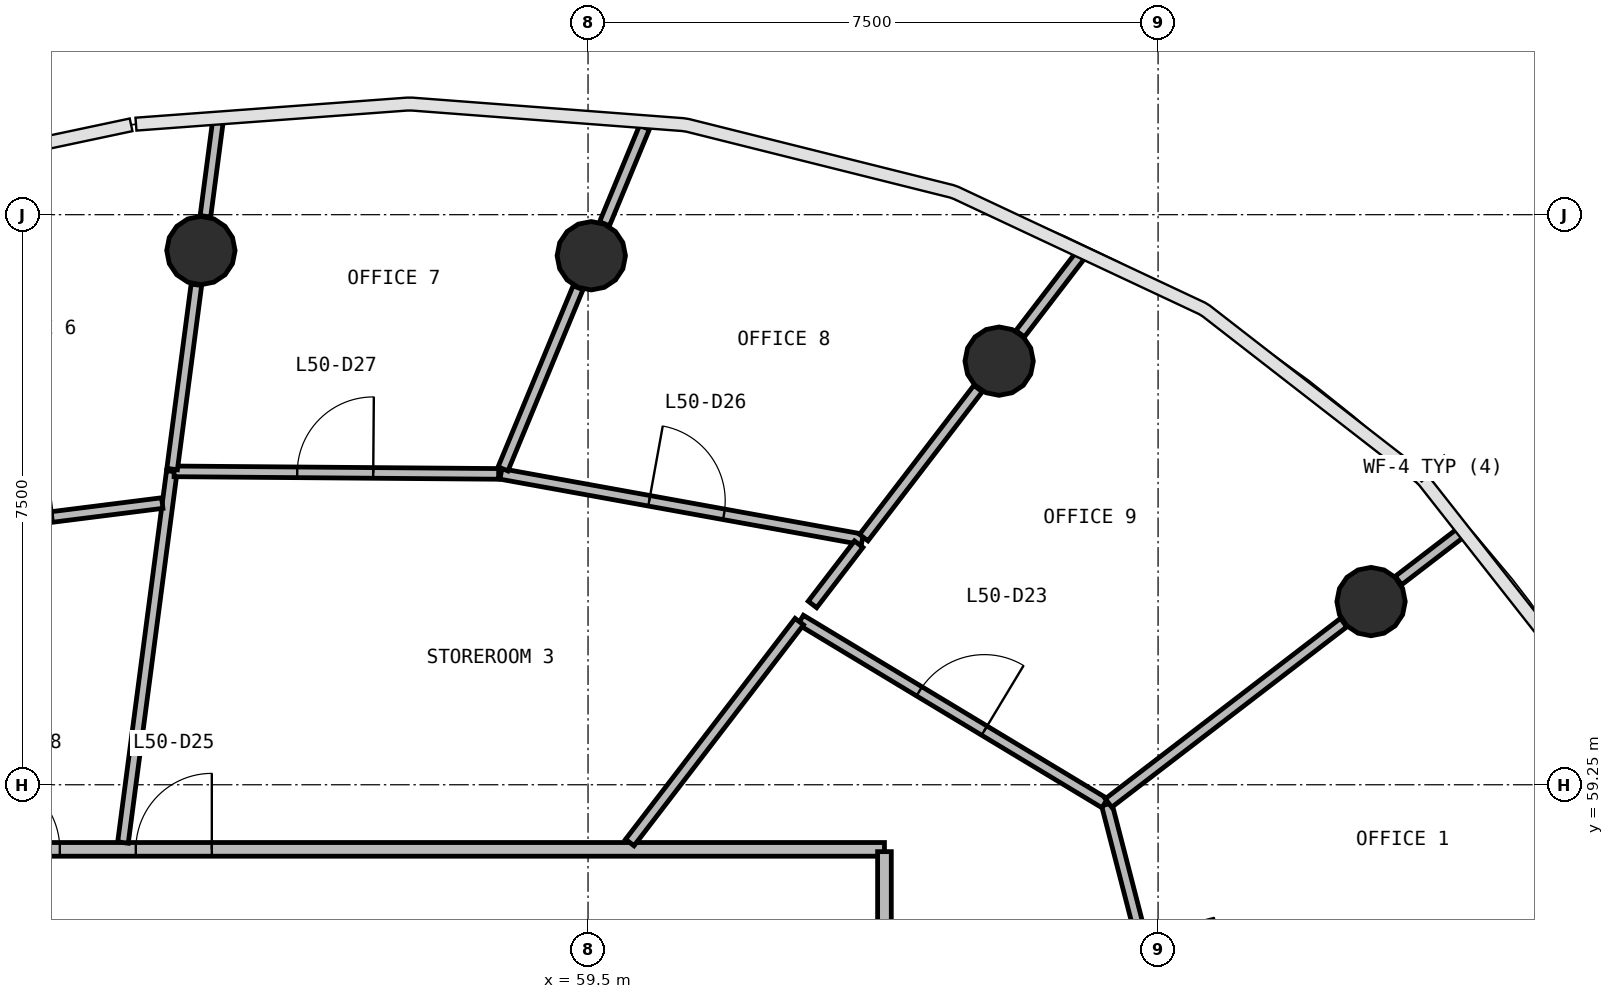
"""IFC4 building model, lengths in metres.
Left out: names, types, materials, properties, quantities, classifications, styles, units other than length and angle.
Written with IfcOpenShell. Run it as: python <this file> out.ifc"""

import sys

from ifc_helpers import new_model, si_unit, direction, frame, frame_2d, origin, origin_2d, place, context, subcontext, project, spatial, rectangle, circle, extrude, source, transform, mapped, element, fill, save


model = new_model("IFC4")
c1 = context("Model", 3, precision=1e-05, world=origin(), true_north=direction((0.0, 1.0)))
c2 = subcontext(c1, "Body", "Model", "MODEL_VIEW")
j1 = project(units=[si_unit("LENGTHUNIT", "METRE"), si_unit("PLANEANGLEUNIT", "RADIAN")], contexts=[c1])
p1 = place(None, origin())
s1 = spatial("IfcSite", under=j1, at=p1, CompositionType="ELEMENT")
p2 = place(p1, origin())
s2 = spatial("IfcBuilding", under=s1, at=p2, CompositionType="ELEMENT")
p3 = place(p2, frame((0.0, 0.0, 207.2)))
s3 = spatial("IfcBuildingStorey", under=s2, at=p3, CompositionType="ELEMENT", Elevation=207.2)
m1 = source(origin(), c2, "Body", "SweptSolid", [
    extrude(circle(Radius=0.45, at=origin_2d()), origin(), (0.0, 0.0, 1.0), 3.9),
])
for number, where, z_axis, x_axis in (
    (1, (69.802, 61.66, 0.0), (0.0, 0.0, 1.0), (1.0, 0.0, 0.0)),
    (2, (64.909, 64.823, 0.0), (0.0, 0.0, 1.0), (1.0, 0.0, 0.0)),
    (3, (59.543, 66.21, 0.0), (0.0, 0.0, 1.0), (1.0, 0.0, 0.0)),
    (4, (54.406, 66.278, 0.0), (0.0, 0.0, 1.0), (1.0, 0.0, 0.0)),
):
    element("IfcColumn", number, at=place(p3, frame(where, z_axis=z_axis, x_axis=x_axis)), inside=s3, PredefinedType="COLUMN", context=c2, shape_type="MappedRepresentation", body=[
        mapped(m1, transform((0.0, 0.0, 0.0), scale=1.0)),
    ])
p4 = place(p3, frame((40.6, 58.4, 0.0), z_axis=(0.0, 0.0, 1.0), x_axis=(1.0, 0.0, 0.0)))
e5 = element("IfcWall", 5, at=p4, inside=s3, PredefinedType="PARTITIONING", context=c2, shape_type="SweptSolid", body=[
    extrude(rectangle(XDim=22.8, YDim=0.18, at=frame_2d((11.4, 0.0))), origin(), (0.0, 0.0, 1.0), 2.88),
])
p5 = place(p4, frame((12.95, 0.0, 0.0)))
e6 = element("IfcOpeningElement", 6, at=p5, cuts=e5, PredefinedType="OPENING", context=c2, shape_type="SweptSolid", body=[
    extrude(rectangle(XDim=1.0, YDim=2.1, at=frame_2d((0.5, 1.05))), frame((0.0, 0.1, 0.0), z_axis=(0.0, -1.0, 0.0), x_axis=(1.0, 0.0, 0.0)), (0.0, 0.0, 1.0), 0.2),
])
p6 = place(p4, frame((10.95, 0.0, 0.0)))
e7 = element("IfcOpeningElement", 7, at=p6, cuts=e5, PredefinedType="OPENING", context=c2, shape_type="SweptSolid", body=[
    extrude(rectangle(XDim=1.0, YDim=2.1, at=frame_2d((0.5, 1.05))), frame((0.0, 0.1, 0.0), z_axis=(0.0, -1.0, 0.0), x_axis=(1.0, 0.0, 0.0)), (0.0, 0.0, 1.0), 0.2),
])
p7 = place(p3, frame((63.4, 58.37, 0.0), z_axis=(0.0, 0.0, 1.0), x_axis=(0.0, -1.0, 0.0)))
e8 = element("IfcWall", 8, at=p7, inside=s3, PredefinedType="PARTITIONING", context=c2, shape_type="SweptSolid", body=[
    extrude(rectangle(XDim=20.74, YDim=0.18, at=frame_2d((10.37, 0.0))), origin(), (0.0, 0.0, 1.0), 2.88),
])
p8 = place(p7, frame((9.99, 0.0, 0.0)))
e9 = element("IfcOpeningElement", 9, at=p8, cuts=e8, PredefinedType="OPENING", context=c2, shape_type="SweptSolid", body=[
    extrude(rectangle(XDim=0.9, YDim=2.1, at=frame_2d((0.45, 1.05))), frame((0.0, 0.1, 0.0), z_axis=(0.0, -1.0, 0.0), x_axis=(1.0, 0.0, 0.0)), (0.0, 0.0, 1.0), 0.2),
])
p9 = place(p7, frame((7.79, 0.0, 0.0)))
e10 = element("IfcOpeningElement", 10, at=p9, cuts=e8, PredefinedType="OPENING", context=c2, shape_type="SweptSolid", body=[
    extrude(rectangle(XDim=0.9, YDim=2.1, at=frame_2d((0.45, 1.05))), frame((0.0, 0.1, 0.0), z_axis=(0.0, -1.0, 0.0), x_axis=(1.0, 0.0, 0.0)), (0.0, 0.0, 1.0), 0.2),
])
p10 = place(p7, frame((4.29, 0.0, 0.0)))
e11 = element("IfcOpeningElement", 11, at=p10, cuts=e8, PredefinedType="OPENING", context=c2, shape_type="SweptSolid", body=[
    extrude(rectangle(XDim=1.0, YDim=2.1, at=frame_2d((0.5, 1.05))), frame((0.0, 0.1, 0.0), z_axis=(0.0, -1.0, 0.0), x_axis=(1.0, 0.0, 0.0)), (0.0, 0.0, 1.0), 0.2),
])
p11 = place(p7, frame((15.49, 0.0, 0.0)))
e12 = element("IfcOpeningElement", 12, at=p11, cuts=e8, PredefinedType="OPENING", context=c2, shape_type="SweptSolid", body=[
    extrude(rectangle(XDim=1.0, YDim=2.1, at=frame_2d((0.5, 1.05))), frame((0.0, 0.1, 0.0), z_axis=(0.0, -1.0, 0.0), x_axis=(1.0, 0.0, 0.0)), (0.0, 0.0, 1.0), 0.2),
])
p12 = place(p7, frame((12.09, 0.0, 0.0)))
e13 = element("IfcOpeningElement", 13, at=p12, cuts=e8, PredefinedType="OPENING", context=c2, shape_type="SweptSolid", body=[
    extrude(rectangle(XDim=1.0, YDim=2.1, at=frame_2d((0.5, 1.05))), frame((0.0, 0.1, 0.0), z_axis=(0.0, -1.0, 0.0), x_axis=(1.0, 0.0, 0.0)), (0.0, 0.0, 1.0), 0.2),
])
p13 = place(p3, frame((53.381, 58.49, 0.0), z_axis=(0.0, 0.0, 1.0), x_axis=(0.130510929427, 0.991446870639, 0.0)))
e14 = element("IfcWall", 14, at=p13, inside=s3, PredefinedType="PARTITIONING", context=c2, shape_type="SweptSolid", body=[
    extrude(rectangle(XDim=4.926, YDim=0.14, at=frame_2d((2.463, 0.0))), origin(), (0.0, 0.0, 1.0), 2.88),
])
p14 = place(p3, frame((58.354, 63.339, 0.0), z_axis=(0.0, 0.0, 1.0), x_axis=(0.983980456021, -0.178276364581, 0.0)))
e15 = element("IfcWall", 15, at=p14, inside=s3, PredefinedType="PARTITIONING", context=c2, shape_type="SweptSolid", body=[
    extrude(rectangle(XDim=4.833, YDim=0.14, at=frame_2d((2.417, 0.0))), origin(), (0.0, 0.0, 1.0), 2.88),
])
p15 = place(p14, frame((1.983, 0.0, 0.0)))
e16 = element("IfcOpeningElement", 16, at=p15, cuts=e15, PredefinedType="OPENING", context=c2, shape_type="SweptSolid", body=[
    extrude(rectangle(XDim=1.0, YDim=2.1, at=frame_2d((0.5, 1.05))), frame((0.0, 0.08, 0.0), z_axis=(0.0, -1.0, 0.0), x_axis=(1.0, 0.0, 0.0)), (0.0, 0.0, 1.0), 0.16),
])
p16 = place(p3, frame((66.324, 58.991, 0.0), z_axis=(0.0, 0.0, 1.0), x_axis=(0.249819251726, -0.968292487561, 0.0)))
e17 = element("IfcWall", 17, at=p16, inside=s3, PredefinedType="PARTITIONING", context=c2, shape_type="SweptSolid", body=[
    extrude(rectangle(XDim=4.649, YDim=0.14, at=frame_2d((2.324, 0.0))), origin(), (0.0, 0.0, 1.0), 2.88),
])
p17 = place(p16, frame((1.799, 0.0, 0.0)))
e18 = element("IfcOpeningElement", 18, at=p17, cuts=e17, PredefinedType="OPENING", context=c2, shape_type="SweptSolid", body=[
    extrude(rectangle(XDim=1.0, YDim=2.1, at=frame_2d((0.5, 1.05))), frame((0.0, 0.08, 0.0), z_axis=(0.0, -1.0, 0.0), x_axis=(1.0, 0.0, 0.0)), (0.0, 0.0, 1.0), 0.16),
])
p18 = place(p3, frame((62.298, 61.42, 0.0), z_axis=(0.0, 0.0, 1.0), x_axis=(0.856310382511, -0.516461546298, 0.0)))
e19 = element("IfcWall", 19, at=p18, inside=s3, PredefinedType="PARTITIONING", context=c2, shape_type="SweptSolid", body=[
    extrude(rectangle(XDim=4.672, YDim=0.14, at=frame_2d((2.336, 0.0))), origin(), (0.0, 0.0, 1.0), 2.88),
])
p19 = place(p18, frame((1.823, 0.0, 0.0)))
e20 = element("IfcOpeningElement", 20, at=p19, cuts=e19, PredefinedType="OPENING", context=c2, shape_type="SweptSolid", body=[
    extrude(rectangle(XDim=1.0, YDim=2.1, at=frame_2d((0.5, 1.05))), frame((0.0, 0.08, 0.0), z_axis=(0.0, -1.0, 0.0), x_axis=(1.0, 0.0, 0.0)), (0.0, 0.0, 1.0), 0.16),
])
p20 = place(p3, frame((54.054, 63.373, 0.0), z_axis=(0.0, 0.0, 1.0), x_axis=(0.999969319587, -0.007833255005, 0.0)))
e21 = element("IfcWall", 21, at=p20, inside=s3, PredefinedType="PARTITIONING", context=c2, shape_type="SweptSolid", body=[
    extrude(rectangle(XDim=4.27, YDim=0.14, at=frame_2d((2.135, 0.0))), origin(), (0.0, 0.0, 1.0), 2.88),
])
p21 = place(p20, frame((1.62, 0.0, 0.0)))
e22 = element("IfcOpeningElement", 22, at=p21, cuts=e21, PredefinedType="OPENING", context=c2, shape_type="SweptSolid", body=[
    extrude(rectangle(XDim=1.0, YDim=2.1, at=frame_2d((0.5, 1.05))), frame((0.0, 0.08, 0.0), z_axis=(0.0, -1.0, 0.0), x_axis=(1.0, 0.0, 0.0)), (0.0, 0.0, 1.0), 0.16),
])
p22 = place(p3, frame((66.348, 59.01, 0.0), z_axis=(0.0, 0.0, 1.0), x_axis=(0.793347300472, 0.608769300173, 0.0)))
e23 = element("IfcWall", 23, at=p22, inside=s3, PredefinedType="PARTITIONING", context=c2, shape_type="SweptSolid", body=[
    extrude(rectangle(XDim=3.899, YDim=0.14, at=frame_2d((1.95, 0.0))), origin(), (0.0, 0.0, 1.0), 2.88),
])
p23 = place(p3, frame((50.094, 62.476, 0.0), z_axis=(0.0, 0.0, 1.0), x_axis=(0.99213420041, 0.12517878565, 0.0)))
e24 = element("IfcWall", 24, at=p23, inside=s3, PredefinedType="PARTITIONING", context=c2, shape_type="SweptSolid", body=[
    extrude(rectangle(XDim=3.834, YDim=0.14, at=frame_2d((1.917, 0.0))), origin(), (0.0, 0.0, 1.0), 2.88),
])
p24 = place(p23, frame((1.385, 0.0, 0.0)))
e25 = element("IfcOpeningElement", 25, at=p24, cuts=e24, PredefinedType="OPENING", context=c2, shape_type="SweptSolid", body=[
    extrude(rectangle(XDim=1.0, YDim=2.1, at=frame_2d((0.5, 1.05))), frame((0.0, 0.08, 0.0), z_axis=(0.0, -1.0, 0.0), x_axis=(1.0, 0.0, 0.0)), (0.0, 0.0, 1.0), 0.16),
])
p25 = place(p3, frame((60.049, 58.49, 0.0), z_axis=(0.0, 0.0, 1.0), x_axis=(0.60875050296, 0.793361724024, 0.0)))
e26 = element("IfcWall", 26, at=p25, inside=s3, PredefinedType="PARTITIONING", context=c2, shape_type="SweptSolid", body=[
    extrude(rectangle(XDim=3.663, YDim=0.14, at=frame_2d((1.832, 0.0))), origin(), (0.0, 0.0, 1.0), 2.88),
])
p26 = place(p3, frame((62.453, 61.622, 0.0), z_axis=(0.0, 0.0, 1.0), x_axis=(0.608872401912, 0.793268175455, 0.0)))
e27 = element("IfcWall", 27, at=p26, inside=s3, PredefinedType="PARTITIONING", context=c2, shape_type="SweptSolid", body=[
    extrude(rectangle(XDim=1.0, YDim=0.14, at=frame_2d((0.5, 0.0))), origin(), (0.0, 0.0, 1.0), 2.88),
])
p27 = place(p3, frame((63.127, 62.501, 0.0), z_axis=(0.0, 0.0, 1.0), x_axis=(0.608750837214, 0.793361467549, 0.0)))
e28 = element("IfcWall", 28, at=p27, inside=s3, PredefinedType="PARTITIONING", context=c2, shape_type="SweptSolid", body=[
    extrude(rectangle(XDim=2.472, YDim=0.14, at=frame_2d((1.236, 0.0))), origin(), (0.0, 0.0, 1.0), 2.88),
])
p28 = place(p3, frame((54.028, 63.403, 0.0), z_axis=(0.0, 0.0, 1.0), x_axis=(0.130581052229, 0.991437637373, 0.0)))
e29 = element("IfcWall", 29, at=p28, inside=s3, PredefinedType="PARTITIONING", context=c2, shape_type="SweptSolid", body=[
    extrude(rectangle(XDim=2.446, YDim=0.14, at=frame_2d((1.223, 0.0))), origin(), (0.0, 0.0, 1.0), 2.88),
])
p29 = place(p3, frame((58.381, 63.406, 0.0), z_axis=(0.0, 0.0, 1.0), x_axis=(0.382733405642, 0.923858831319, 0.0)))
e30 = element("IfcWall", 30, at=p29, inside=s3, PredefinedType="PARTITIONING", context=c2, shape_type="SweptSolid", body=[
    extrude(rectangle(XDim=2.58, YDim=0.14, at=frame_2d((1.29, 0.0))), origin(), (0.0, 0.0, 1.0), 2.88),
])
p30 = place(p3, frame((59.717, 66.63, 0.0), z_axis=(0.0, 0.0, 1.0), x_axis=(0.382733825207, 0.923858657502, 0.0)))
e31 = element("IfcWall", 31, at=p30, inside=s3, PredefinedType="PARTITIONING", context=c2, shape_type="SweptSolid", body=[
    extrude(rectangle(XDim=1.373, YDim=0.14, at=frame_2d((0.687, 0.0))), origin(), (0.0, 0.0, 1.0), 2.88),
])
p31 = place(p3, frame((65.186, 65.184, 0.0), z_axis=(0.0, 0.0, 1.0), x_axis=(0.608692849826, 0.79340595824, 0.0)))
e32 = element("IfcWall", 32, at=p31, inside=s3, PredefinedType="PARTITIONING", context=c2, shape_type="SweptSolid", body=[
    extrude(rectangle(XDim=1.334, YDim=0.14, at=frame_2d((0.667, 0.0))), origin(), (0.0, 0.0, 1.0), 2.88),
])
p32 = place(p3, frame((54.466, 66.729, 0.0), z_axis=(0.0, 0.0, 1.0), x_axis=(0.130520415919, 0.991445621821, 0.0)))
e33 = element("IfcWall", 33, at=p32, inside=s3, PredefinedType="PARTITIONING", context=c2, shape_type="SweptSolid", body=[
    extrude(rectangle(XDim=1.246, YDim=0.14, at=frame_2d((0.623, 0.0))), origin(), (0.0, 0.0, 1.0), 2.88),
])
p33 = place(p3, frame((70.163, 61.937, 0.0), z_axis=(0.0, 0.0, 1.0), x_axis=(0.793403619358, 0.608695898449, 0.0)))
e34 = element("IfcWall", 34, at=p33, inside=s3, PredefinedType="PARTITIONING", context=c2, shape_type="SweptSolid", body=[
    extrude(rectangle(XDim=1.047, YDim=0.14, at=frame_2d((0.523, 0.0))), origin(), (0.0, 0.0, 1.0), 2.88),
])
m2 = source(origin(), c2, "Body", "SweptSolid", [
    extrude(rectangle(XDim=1.0, YDim=2.1, at=frame_2d((0.5, 1.05))), frame((0.0, 0.025, 0.0), z_axis=(0.0, -1.0, 0.0), x_axis=(1.0, 0.0, 0.0)), (0.0, 0.0, 1.0), 0.05),
])
p34 = place(p19, origin())
e35 = element("IfcDoor", 35, at=p34, inside=s3, OperationType="SINGLE_SWING_RIGHT", PredefinedType="DOOR", context=c2, shape_type="MappedRepresentation", body=[
    mapped(m2, transform((0.0, 0.0, 0.0), scale=1.0)),
])
fill(e20, e35)
p35 = place(p5, origin())
e36 = element("IfcDoor", 36, at=p35, inside=s3, OperationType="SINGLE_SWING_RIGHT", PredefinedType="DOOR", context=c2, shape_type="MappedRepresentation", body=[
    mapped(m2, transform((0.0, 0.0, 0.0), scale=1.0)),
])
fill(e6, e36)
p36 = place(p15, origin())
e37 = element("IfcDoor", 37, at=p36, inside=s3, OperationType="SINGLE_SWING_LEFT", PredefinedType="DOOR", context=c2, shape_type="MappedRepresentation", body=[
    mapped(m2, transform((0.0, 0.0, 0.0), scale=1.0)),
])
fill(e16, e37)
p37 = place(p21, origin())
e38 = element("IfcDoor", 38, at=p37, inside=s3, OperationType="SINGLE_SWING_RIGHT", PredefinedType="DOOR", context=c2, shape_type="MappedRepresentation", body=[
    mapped(m2, transform((0.0, 0.0, 0.0), scale=1.0)),
])
fill(e22, e38)
p38 = place(p6, origin())
e39 = element("IfcDoor", 39, at=p38, inside=s3, OperationType="SINGLE_SWING_LEFT", PredefinedType="DOOR", context=c2, shape_type="MappedRepresentation", body=[
    mapped(m2, transform((0.0, 0.0, 0.0), scale=1.0)),
])
fill(e7, e39)
p39 = place(p24, origin())
e40 = element("IfcDoor", 40, at=p39, inside=s3, OperationType="SINGLE_SWING_RIGHT", PredefinedType="DOOR", context=c2, shape_type="MappedRepresentation", body=[
    mapped(m2, transform((0.0, 0.0, 0.0), scale=1.0)),
])
fill(e25, e40)
save(model, sys.argv[1])
